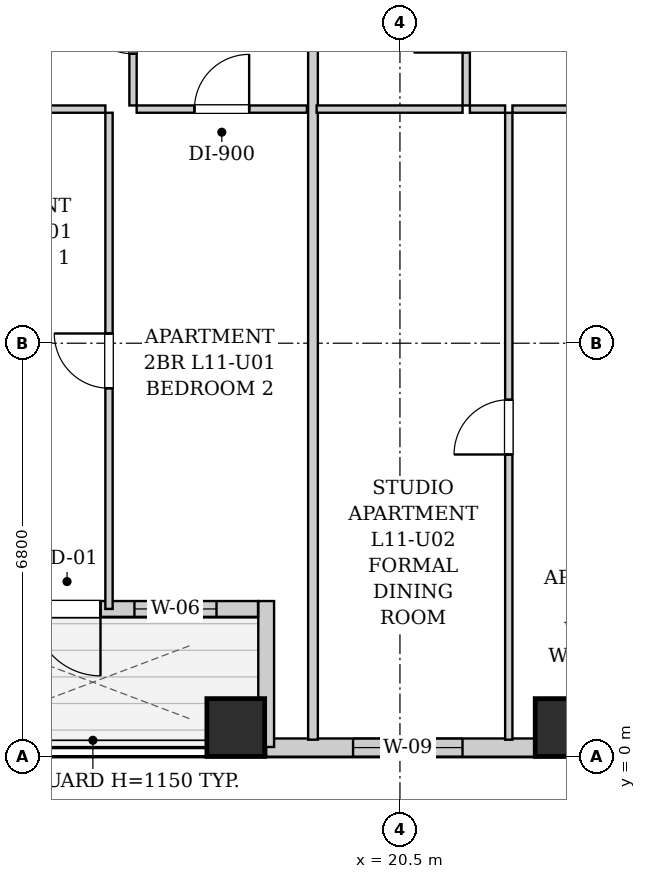
"""IFC4 building model, lengths in metres.
Left out: names, types, materials, properties, quantities, classifications, styles, units other than length and angle.
Written with IfcOpenShell. Run it as: python <this file> out.ifc"""

import sys

from ifc_helpers import new_model, si_unit, direction, frame, frame_2d, origin, origin_2d, place, context, subcontext, project, spatial, rectangle, extrude, element, fill, save


model = new_model("IFC4")
c1 = context("Model", 3, precision=1e-05, world=origin(), true_north=direction((0.0, 1.0)))
c2 = subcontext(c1, "Body", "Model", "MODEL_VIEW")
j1 = project(units=[si_unit("LENGTHUNIT", "METRE"), si_unit("PLANEANGLEUNIT", "RADIAN")], contexts=[c1])
p1 = place(None, origin())
s1 = spatial("IfcSite", under=j1, at=p1, CompositionType="ELEMENT")
p2 = place(p1, origin())
s2 = spatial("IfcBuilding", under=s1, at=p2, CompositionType="ELEMENT")
p3 = place(p2, frame((0.0, 0.0, 45.0)))
s3 = spatial("IfcBuildingStorey", under=s2, at=p3, CompositionType="ELEMENT", Elevation=45.0)
for number, where, z_axis, x_axis in (
    (1, (17.8, 0.48, 0.0), (0.0, 0.0, 1.0), (1.0, 0.0, 0.0)),
    (2, (23.2, 0.48, 0.0), (0.0, 0.0, 1.0), (1.0, 0.0, 0.0)),
):
    element("IfcColumn", number, at=place(p3, frame(where, z_axis=z_axis, x_axis=x_axis)), inside=s3, PredefinedType="COLUMN", context=c2, shape_type="SweptSolid", body=[
        extrude(rectangle(XDim=0.95, YDim=0.95, at=origin_2d()), origin(), (0.0, 0.0, 1.0), 3.2),
    ])
p4 = place(p3, frame((44.0, 0.15, 0.0), z_axis=(0.0, 0.0, 1.0), x_axis=(-1.0, 0.0, 0.0)))
e3 = element("IfcWall", 3, at=p4, inside=s3, PredefinedType="SOLIDWALL", context=c2, shape_type="SweptSolid", body=[
    extrude(rectangle(XDim=25.7, YDim=0.3, at=frame_2d((12.85, 0.0))), origin(), (0.0, 0.0, 1.0), 1.975),
])
p5 = place(p4, frame((22.471, 0.0, 0.55)))
e4 = element("IfcOpeningElement", 4, at=p5, cuts=e3, PredefinedType="OPENING", context=c2, shape_type="SweptSolid", body=[
    extrude(rectangle(XDim=1.8, YDim=1.2, at=frame_2d((0.9, 0.6))), frame((0.0, 0.16, 0.0), z_axis=(0.0, -1.0, 0.0), x_axis=(1.0, 0.0, 0.0)), (0.0, 0.0, 1.0), 0.32),
])
p6 = place(p4, frame((15.65, 0.0, 0.55)))
e5 = element("IfcOpeningElement", 5, at=p6, cuts=e3, PredefinedType="OPENING", context=c2, shape_type="SweptSolid", body=[
    extrude(rectangle(XDim=0.85, YDim=1.2, at=frame_2d((0.425, 0.6))), frame((0.0, 0.16, 0.0), z_axis=(0.0, -1.0, 0.0), x_axis=(1.0, 0.0, 0.0)), (0.0, 0.0, 1.0), 0.32),
])
p7 = place(p4, frame((12.777, 0.0, 0.55)))
e6 = element("IfcOpeningElement", 6, at=p7, cuts=e3, PredefinedType="OPENING", context=c2, shape_type="SweptSolid", body=[
    extrude(rectangle(XDim=1.8, YDim=1.2, at=frame_2d((0.9, 0.6))), frame((0.0, 0.16, 0.0), z_axis=(0.0, -1.0, 0.0), x_axis=(1.0, 0.0, 0.0)), (0.0, 0.0, 1.0), 0.32),
])
p8 = place(p4, frame((9.315, 0.0, 0.55)))
e7 = element("IfcOpeningElement", 7, at=p8, cuts=e3, PredefinedType="OPENING", context=c2, shape_type="SweptSolid", body=[
    extrude(rectangle(XDim=0.85, YDim=1.2, at=frame_2d((0.425, 0.6))), frame((0.0, 0.16, 0.0), z_axis=(0.0, -1.0, 0.0), x_axis=(1.0, 0.0, 0.0)), (0.0, 0.0, 1.0), 0.32),
])
p9 = place(p4, frame((6.435, 0.0, 0.55)))
e8 = element("IfcOpeningElement", 8, at=p9, cuts=e3, PredefinedType="OPENING", context=c2, shape_type="SweptSolid", body=[
    extrude(rectangle(XDim=1.8, YDim=1.2, at=frame_2d((0.9, 0.6))), frame((0.0, 0.16, 0.0), z_axis=(0.0, -1.0, 0.0), x_axis=(1.0, 0.0, 0.0)), (0.0, 0.0, 1.0), 0.32),
])
p10 = place(p4, frame((2.106, 0.0, 0.55)))
e9 = element("IfcOpeningElement", 9, at=p10, cuts=e3, PredefinedType="OPENING", context=c2, shape_type="SweptSolid", body=[
    extrude(rectangle(XDim=1.8, YDim=1.2, at=frame_2d((0.9, 0.6))), frame((0.0, 0.16, 0.0), z_axis=(0.0, -1.0, 0.0), x_axis=(1.0, 0.0, 0.0)), (0.0, 0.0, 1.0), 0.32),
])
p11 = place(p3, frame((18.3, 0.16, 0.0), z_axis=(0.0, 0.0, 1.0), x_axis=(0.0, 1.0, 0.0)))
e10 = element("IfcWall", 10, at=p11, inside=s3, PredefinedType="SOLIDWALL", context=c2, shape_type="SweptSolid", body=[
    extrude(rectangle(XDim=2.4, YDim=0.26, at=frame_2d((1.2, 0.0))), origin(), (0.0, 0.0, 1.0), 2.94),
])
p12 = place(p3, frame((18.166, 2.43, 0.0), z_axis=(0.0, 0.0, 1.0), x_axis=(-1.0, 0.0, 0.0)))
e11 = element("IfcWall", 11, at=p12, inside=s3, PredefinedType="SOLIDWALL", context=c2, shape_type="SweptSolid", body=[
    extrude(rectangle(XDim=5.432, YDim=0.26, at=frame_2d((2.716, 0.0))), origin(), (0.0, 0.0, 1.0), 2.94),
])
p13 = place(p12, frame((2.591, 0.0, 0.0)))
e12 = element("IfcOpeningElement", 12, at=p13, cuts=e11, PredefinedType="OPENING", context=c2, shape_type="SweptSolid", body=[
    extrude(rectangle(XDim=1.1, YDim=2.0, at=frame_2d((0.55, 1.0))), frame((0.0, 0.14, 0.0), z_axis=(0.0, -1.0, 0.0), x_axis=(1.0, 0.0, 0.0)), (0.0, 0.0, 1.0), 0.28),
])
p14 = place(p12, frame((3.851, 0.0, 0.55)))
e13 = element("IfcOpeningElement", 13, at=p14, cuts=e11, PredefinedType="OPENING", context=c2, shape_type="SweptSolid", body=[
    extrude(rectangle(XDim=0.85, YDim=1.2, at=frame_2d((0.425, 0.6))), frame((0.0, 0.14, 0.0), z_axis=(0.0, -1.0, 0.0), x_axis=(1.0, 0.0, 0.0)), (0.0, 0.0, 1.0), 0.28),
])
p15 = place(p12, frame((0.683, 0.0, 0.85)))
e14 = element("IfcOpeningElement", 14, at=p15, cuts=e11, PredefinedType="OPENING", context=c2, shape_type="SweptSolid", body=[
    extrude(rectangle(XDim=1.35, YDim=1.65, at=frame_2d((0.675, 0.825))), frame((0.0, 0.14, 0.0), z_axis=(0.0, -1.0, 0.0), x_axis=(1.0, 0.0, 0.0)), (0.0, 0.0, 1.0), 0.28),
])
p16 = place(p3, frame((16.11, 10.71, 0.0), z_axis=(0.0, 0.0, 1.0), x_axis=(0.0, 1.0, 0.0)))
e15 = element("IfcWall", 15, at=p16, inside=s3, PredefinedType="PARTITIONING", context=c2, shape_type="SweptSolid", body=[
    extrude(rectangle(XDim=2.6, YDim=0.12, at=frame_2d((1.3, 0.0))), origin(), (0.0, 0.0, 1.0), 2.94),
])
p17 = place(p16, frame((0.85, 0.0, 0.0)))
e16 = element("IfcOpeningElement", 16, at=p17, cuts=e15, PredefinedType="OPENING", context=c2, shape_type="SweptSolid", body=[
    extrude(rectangle(XDim=0.9, YDim=2.05, at=frame_2d((0.45, 1.025))), frame((0.0, 0.07, 0.0), z_axis=(0.0, -1.0, 0.0), x_axis=(1.0, 0.0, 0.0)), (0.0, 0.0, 1.0), 0.14),
])
p18 = place(p3, frame((12.6, 10.65, 0.0), z_axis=(0.0, 0.0, 1.0), x_axis=(1.0, 0.0, 0.0)))
e17 = element("IfcWall", 17, at=p18, inside=s3, PredefinedType="PARTITIONING", context=c2, shape_type="SweptSolid", body=[
    extrude(rectangle(XDim=3.055, YDim=0.12, at=frame_2d((1.527, 0.0))), origin(), (0.0, 0.0, 1.0), 2.94),
])
p19 = place(p18, frame((1.077, 0.0, 0.0)))
e18 = element("IfcOpeningElement", 18, at=p19, cuts=e17, PredefinedType="OPENING", context=c2, shape_type="SweptSolid", body=[
    extrude(rectangle(XDim=0.9, YDim=2.05, at=frame_2d((0.45, 1.025))), frame((0.0, 0.07, 0.0), z_axis=(0.0, -1.0, 0.0), x_axis=(1.0, 0.0, 0.0)), (0.0, 0.0, 1.0), 0.14),
])
p20 = place(p3, frame((16.17, 10.65, 0.0), z_axis=(0.0, 0.0, 1.0), x_axis=(1.0, 0.0, 0.0)))
e19 = element("IfcWall", 19, at=p20, inside=s3, PredefinedType="PARTITIONING", context=c2, shape_type="SweptSolid", body=[
    extrude(rectangle(XDim=2.8, YDim=0.12, at=frame_2d((1.4, 0.0))), origin(), (0.0, 0.0, 1.0), 2.94),
])
p21 = place(p20, frame((0.95, 0.0, 0.0)))
e20 = element("IfcOpeningElement", 20, at=p21, cuts=e19, PredefinedType="OPENING", context=c2, shape_type="SweptSolid", body=[
    extrude(rectangle(XDim=0.9, YDim=2.05, at=frame_2d((0.45, 1.025))), frame((0.0, 0.07, 0.0), z_axis=(0.0, -1.0, 0.0), x_axis=(1.0, 0.0, 0.0)), (0.0, 0.0, 1.0), 0.14),
])
p22 = place(p3, frame((15.715, 2.43, 0.0), z_axis=(0.0, 0.0, 1.0), x_axis=(0.0, 1.0, 0.0)))
e21 = element("IfcWall", 21, at=p22, inside=s3, PredefinedType="PARTITIONING", context=c2, shape_type="SweptSolid", body=[
    extrude(rectangle(XDim=8.16, YDim=0.12, at=frame_2d((4.08, 0.0))), origin(), (0.0, 0.0, 1.0), 2.94),
])
p23 = place(p22, frame((3.63, 0.0, 0.0)))
e22 = element("IfcOpeningElement", 22, at=p23, cuts=e21, PredefinedType="OPENING", context=c2, shape_type="SweptSolid", body=[
    extrude(rectangle(XDim=0.9, YDim=2.05, at=frame_2d((0.45, 1.025))), frame((0.0, 0.07, 0.0), z_axis=(0.0, -1.0, 0.0), x_axis=(1.0, 0.0, 0.0)), (0.0, 0.0, 1.0), 0.14),
])
p24 = place(p3, frame((19.07, 0.28, 0.0), z_axis=(0.0, 0.0, 1.0), x_axis=(0.0, 1.0, 0.0)))
e23 = element("IfcWall", 23, at=p24, inside=s3, PredefinedType="PARTITIONING", context=c2, shape_type="SweptSolid", body=[
    extrude(rectangle(XDim=13.03, YDim=0.16, at=frame_2d((6.515, 0.0))), origin(), (0.0, 0.0, 1.0), 2.94),
])
p25 = place(p3, frame((21.59, 10.71, 0.0), z_axis=(0.0, 0.0, 1.0), x_axis=(0.0, 1.0, 0.0)))
e24 = element("IfcWall", 24, at=p25, inside=s3, PredefinedType="PARTITIONING", context=c2, shape_type="SweptSolid", body=[
    extrude(rectangle(XDim=2.6, YDim=0.12, at=frame_2d((1.3, 0.0))), origin(), (0.0, 0.0, 1.0), 2.94),
])
p26 = place(p25, frame((0.87, 0.0, 0.0)))
e25 = element("IfcOpeningElement", 25, at=p26, cuts=e24, PredefinedType="OPENING", context=c2, shape_type="SweptSolid", body=[
    extrude(rectangle(XDim=0.86, YDim=2.05, at=frame_2d((0.43, 1.025))), frame((0.0, 0.07, 0.0), z_axis=(0.0, -1.0, 0.0), x_axis=(1.0, 0.0, 0.0)), (0.0, 0.0, 1.0), 0.14),
])
p27 = place(p3, frame((19.13, 10.65, 0.0), z_axis=(0.0, 0.0, 1.0), x_axis=(1.0, 0.0, 0.0)))
e26 = element("IfcWall", 26, at=p27, inside=s3, PredefinedType="PARTITIONING", context=c2, shape_type="SweptSolid", body=[
    extrude(rectangle(XDim=2.4, YDim=0.12, at=frame_2d((1.2, 0.0))), origin(), (0.0, 0.0, 1.0), 2.94),
])
p28 = place(p3, frame((21.65, 10.65, 0.0), z_axis=(0.0, 0.0, 1.0), x_axis=(1.0, 0.0, 0.0)))
e27 = element("IfcWall", 27, at=p28, inside=s3, PredefinedType="PARTITIONING", context=c2, shape_type="SweptSolid", body=[
    extrude(rectangle(XDim=0.58, YDim=0.12, at=frame_2d((0.29, 0.0))), origin(), (0.0, 0.0, 1.0), 2.94),
])
p29 = place(p3, frame((22.35, 10.65, 0.0), z_axis=(0.0, 0.0, 1.0), x_axis=(1.0, 0.0, 0.0)))
e28 = element("IfcWall", 28, at=p29, inside=s3, PredefinedType="PARTITIONING", context=c2, shape_type="SweptSolid", body=[
    extrude(rectangle(XDim=3.1, YDim=0.12, at=frame_2d((1.55, 0.0))), origin(), (0.0, 0.0, 1.0), 2.94),
])
p30 = place(p29, frame((1.1, 0.0, 0.0)))
e29 = element("IfcOpeningElement", 29, at=p30, cuts=e28, PredefinedType="OPENING", context=c2, shape_type="SweptSolid", body=[
    extrude(rectangle(XDim=0.9, YDim=2.05, at=frame_2d((0.45, 1.025))), frame((0.0, 0.07, 0.0), z_axis=(0.0, -1.0, 0.0), x_axis=(1.0, 0.0, 0.0)), (0.0, 0.0, 1.0), 0.14),
])
p31 = place(p3, frame((22.29, 0.28, 0.0), z_axis=(0.0, 0.0, 1.0), x_axis=(0.0, 1.0, 0.0)))
e30 = element("IfcWall", 30, at=p31, inside=s3, PredefinedType="PARTITIONING", context=c2, shape_type="SweptSolid", body=[
    extrude(rectangle(XDim=10.31, YDim=0.12, at=frame_2d((5.155, 0.0))), origin(), (0.0, 0.0, 1.0), 2.94),
])
p32 = place(p31, frame((4.69, 0.0, 0.0)))
e31 = element("IfcOpeningElement", 31, at=p32, cuts=e30, PredefinedType="OPENING", context=c2, shape_type="SweptSolid", body=[
    extrude(rectangle(XDim=0.9, YDim=2.05, at=frame_2d((0.45, 1.025))), frame((0.0, 0.07, 0.0), z_axis=(0.0, -1.0, 0.0), x_axis=(1.0, 0.0, 0.0)), (0.0, 0.0, 1.0), 0.14),
])
p33 = place(p17, origin())
e32 = element("IfcDoor", 32, at=p33, inside=s3, OperationType="SINGLE_SWING_RIGHT", PredefinedType="DOOR", context=c2, shape_type="SweptSolid", body=[
    extrude(rectangle(XDim=0.9, YDim=2.05, at=frame_2d((0.45, 1.025))), frame((0.0, 0.025, 0.0), z_axis=(0.0, -1.0, 0.0), x_axis=(1.0, 0.0, 0.0)), (0.0, 0.0, 1.0), 0.05),
])
fill(e16, e32)
p34 = place(p21, origin())
e33 = element("IfcDoor", 33, at=p34, inside=s3, OperationType="SINGLE_SWING_RIGHT", PredefinedType="DOOR", context=c2, shape_type="SweptSolid", body=[
    extrude(rectangle(XDim=0.9, YDim=2.05, at=frame_2d((0.45, 1.025))), frame((0.0, 0.025, 0.0), z_axis=(0.0, -1.0, 0.0), x_axis=(1.0, 0.0, 0.0)), (0.0, 0.0, 1.0), 0.05),
])
fill(e20, e33)
p35 = place(p23, origin())
e34 = element("IfcDoor", 34, at=p35, inside=s3, OperationType="SINGLE_SWING_RIGHT", PredefinedType="DOOR", context=c2, shape_type="SweptSolid", body=[
    extrude(rectangle(XDim=0.9, YDim=2.05, at=frame_2d((0.45, 1.025))), frame((0.0, 0.025, 0.0), z_axis=(0.0, -1.0, 0.0), x_axis=(1.0, 0.0, 0.0)), (0.0, 0.0, 1.0), 0.05),
])
fill(e22, e34)
p36 = place(p26, origin())
e35 = element("IfcDoor", 35, at=p36, inside=s3, OperationType="SINGLE_SWING_LEFT", PredefinedType="DOOR", context=c2, shape_type="SweptSolid", body=[
    extrude(rectangle(XDim=0.86, YDim=2.05, at=frame_2d((0.43, 1.025))), frame((0.0, 0.025, 0.0), z_axis=(0.0, -1.0, 0.0), x_axis=(1.0, 0.0, 0.0)), (0.0, 0.0, 1.0), 0.05),
])
fill(e25, e35)
p37 = place(p32, origin())
e36 = element("IfcDoor", 36, at=p37, inside=s3, OperationType="SINGLE_SWING_LEFT", PredefinedType="DOOR", context=c2, shape_type="SweptSolid", body=[
    extrude(rectangle(XDim=0.9, YDim=2.05, at=frame_2d((0.45, 1.025))), frame((0.0, 0.025, 0.0), z_axis=(0.0, -1.0, 0.0), x_axis=(1.0, 0.0, 0.0)), (0.0, 0.0, 1.0), 0.05),
])
fill(e31, e36)
p38 = place(p13, origin())
e37 = element("IfcDoor", 37, at=p38, inside=s3, OperationType="SINGLE_SWING_LEFT", PredefinedType="DOOR", context=c2, shape_type="SweptSolid", body=[
    extrude(rectangle(XDim=1.1, YDim=2.0, at=frame_2d((0.55, 1.0))), frame((0.0, 0.025, 0.0), z_axis=(0.0, -1.0, 0.0), x_axis=(1.0, 0.0, 0.0)), (0.0, 0.0, 1.0), 0.05),
])
fill(e12, e37)
p39 = place(p15, origin())
e38 = element("IfcWindow", 38, at=p39, inside=s3, PartitioningType="SINGLE_PANEL", PredefinedType="WINDOW", context=c2, shape_type="SweptSolid", body=[
    extrude(rectangle(XDim=1.35, YDim=1.65, at=frame_2d((0.675, 0.825))), frame((0.0, 0.03, 0.0), z_axis=(0.0, -1.0, 0.0), x_axis=(1.0, 0.0, 0.0)), (0.0, 0.0, 1.0), 0.06),
])
fill(e14, e38)
p40 = place(p5, origin())
e39 = element("IfcWindow", 39, at=p40, inside=s3, PartitioningType="DOUBLE_PANEL_VERTICAL", PredefinedType="WINDOW", context=c2, shape_type="SweptSolid", body=[
    extrude(rectangle(XDim=1.8, YDim=1.2, at=frame_2d((0.9, 0.6))), frame((0.0, 0.03, 0.0), z_axis=(0.0, -1.0, 0.0), x_axis=(1.0, 0.0, 0.0)), (0.0, 0.0, 1.0), 0.06),
])
fill(e4, e39)
save(model, sys.argv[1])
